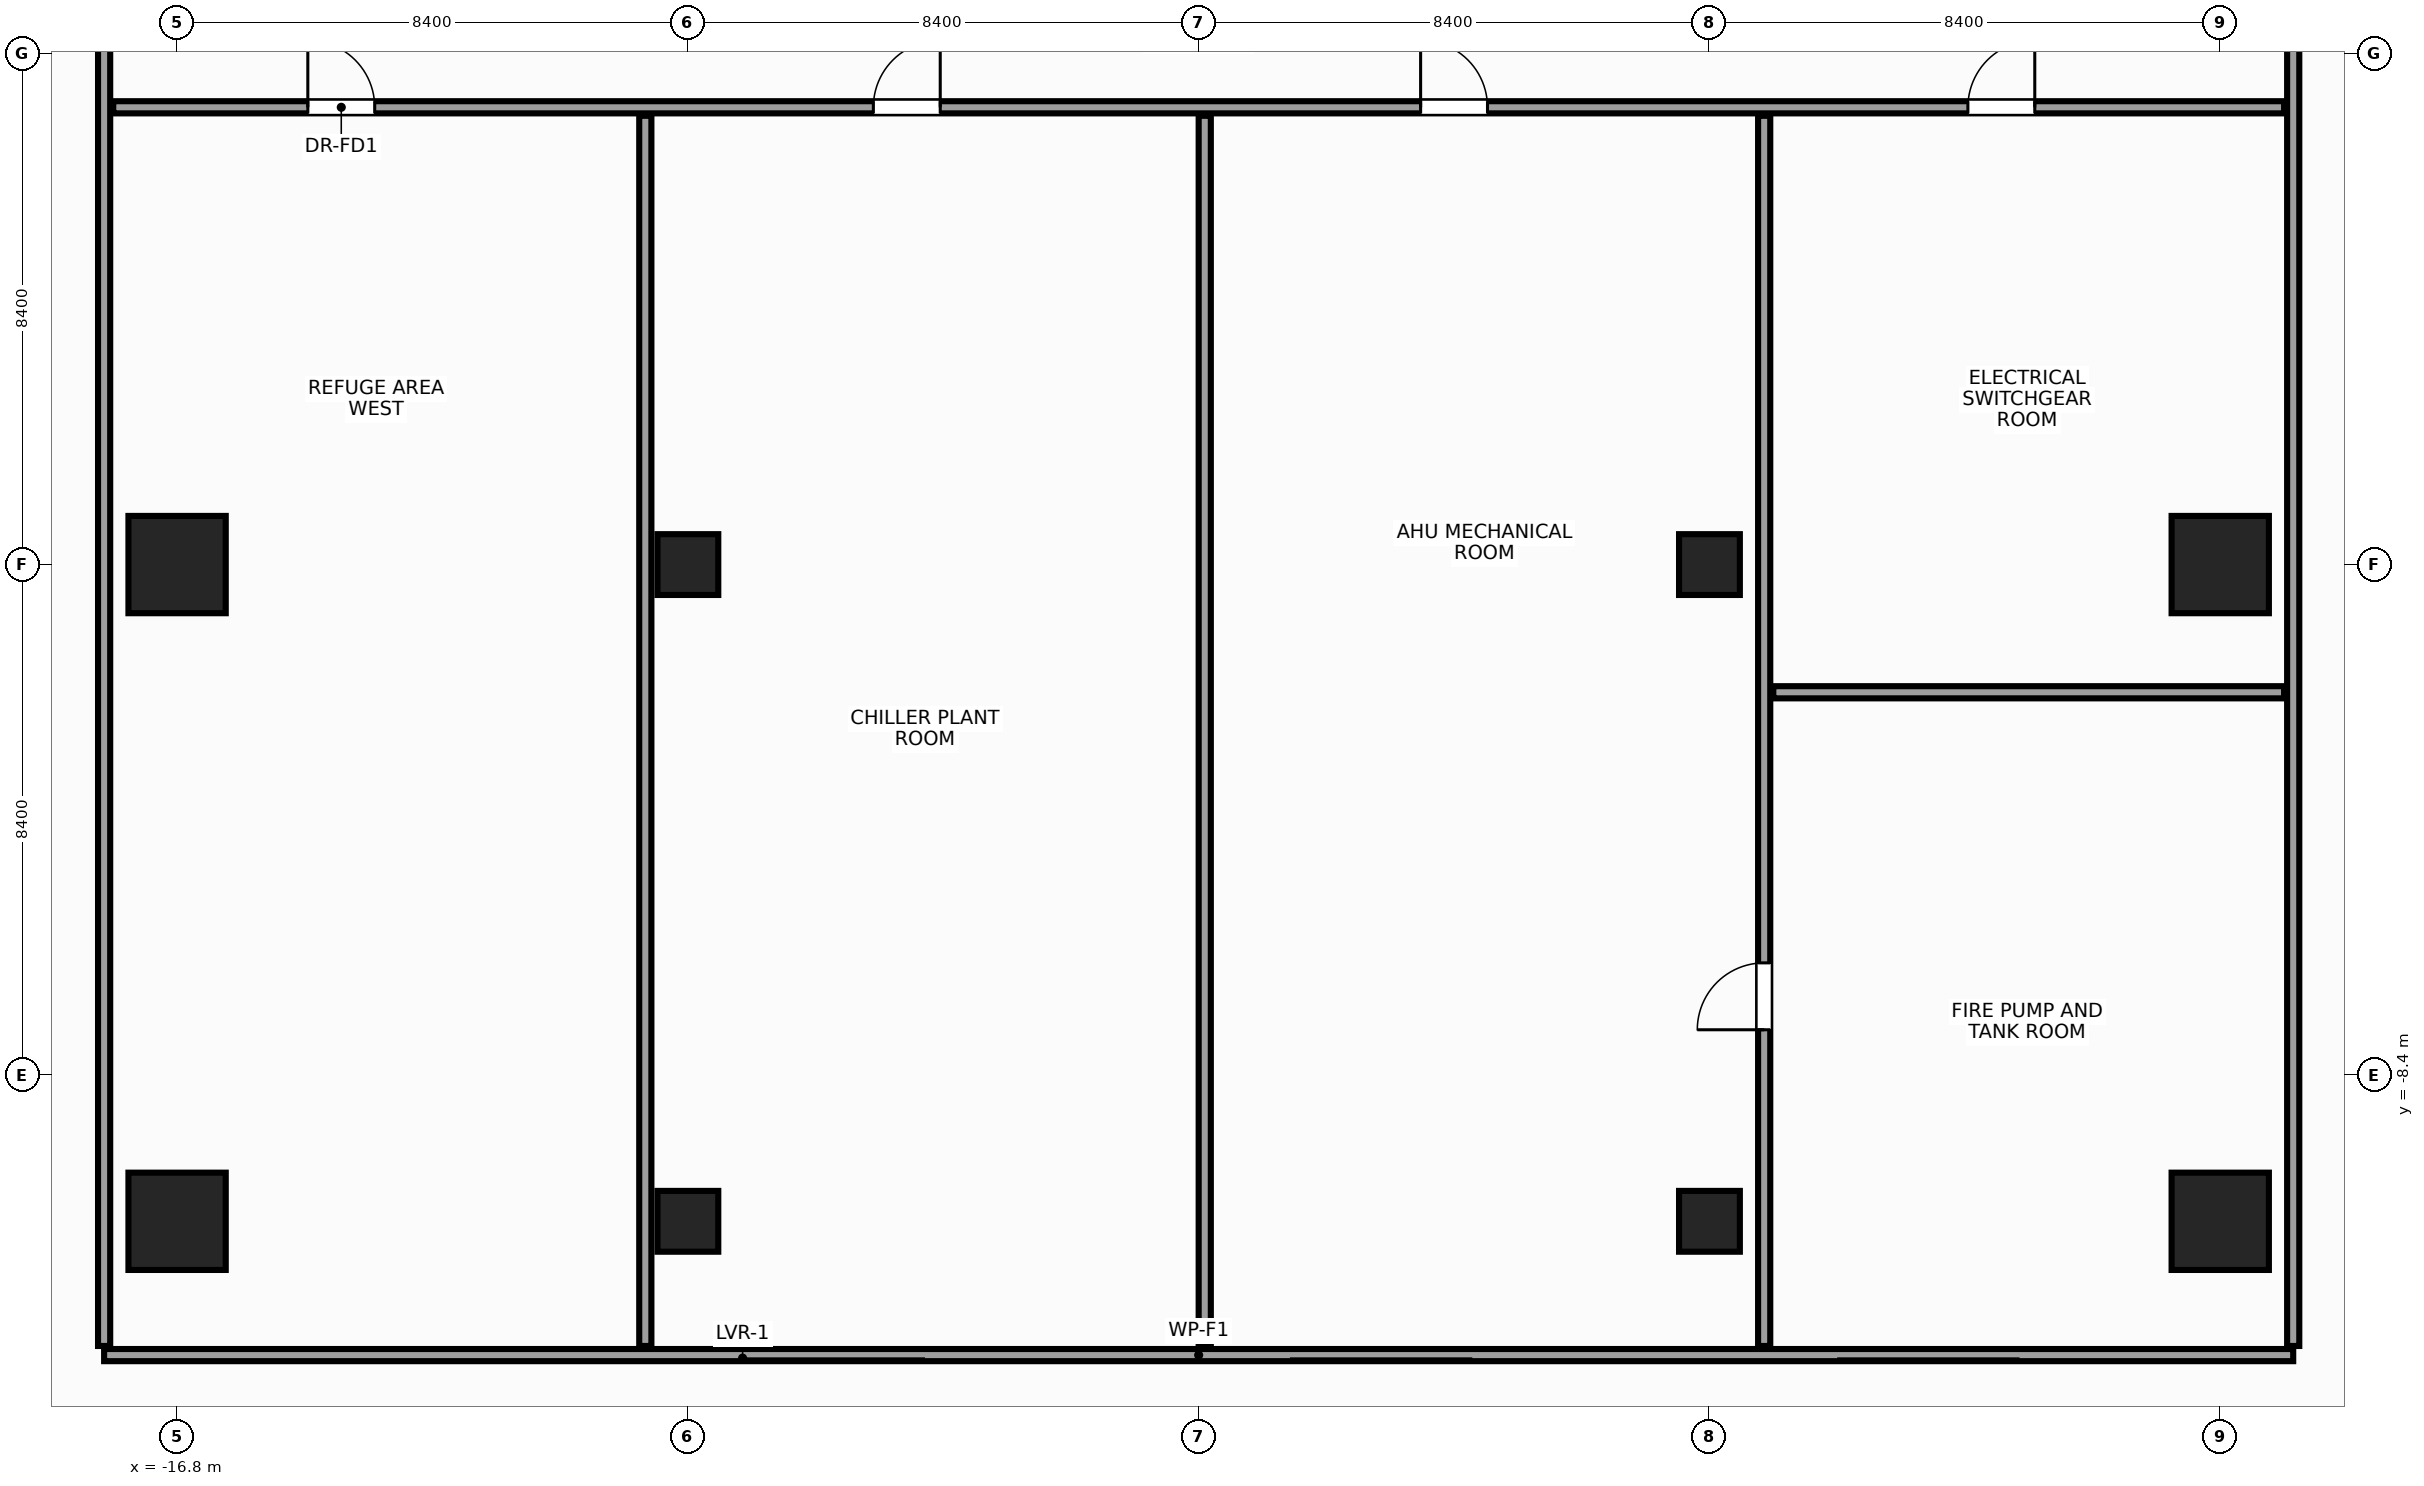
"""IFC4 building model, lengths in metres.
Left out: names, types, materials, properties, quantities, classifications, styles, units other than length and angle.
Written with IfcOpenShell. Run it as: python <this file> out.ifc"""

import sys

from ifc_helpers import new_model, si_unit, direction, frame, frame_2d, origin, origin_2d, place, context, subcontext, project, spatial, rectangle, hollow_rectangle, extrude, source, transform, mapped, element, fill, save


model = new_model("IFC4")
c1 = context("Model", 3, precision=1e-05, world=origin(), true_north=direction((0.0, 1.0)))
c2 = subcontext(c1, "Body", "Model", "MODEL_VIEW")
j1 = project(units=[si_unit("LENGTHUNIT", "METRE"), si_unit("PLANEANGLEUNIT", "RADIAN")], contexts=[c1])
p1 = place(None, origin())
s1 = spatial("IfcSite", under=j1, at=p1, CompositionType="ELEMENT")
p2 = place(p1, origin())
s2 = spatial("IfcBuilding", under=s1, at=p2, CompositionType="ELEMENT")
p3 = place(p2, frame((0.0, 0.0, 189.2)))
s3 = spatial("IfcBuildingStorey", under=s2, at=p3, CompositionType="ELEMENT", Elevation=189.2)
m1 = source(origin(), c2, "Body", "SweptSolid", [
    extrude(rectangle(XDim=1.6, YDim=1.6, at=origin_2d()), origin(), (0.0, 0.0, 1.0), 7.2),
])
for number, where, z_axis, x_axis in (
    (1, (-16.8, -10.8, 0.0), (0.0, 0.0, 1.0), (1.0, 0.0, 0.0)),
    (2, (-16.8, 0.0, 0.0), (0.0, 0.0, 1.0), (1.0, 0.0, 0.0)),
    (3, (16.8, -10.8, 0.0), (0.0, 0.0, 1.0), (1.0, 0.0, 0.0)),
    (4, (16.8, 0.0, 0.0), (0.0, 0.0, 1.0), (1.0, 0.0, 0.0)),
):
    element("IfcColumn", number, at=place(p3, frame(where, z_axis=z_axis, x_axis=x_axis)), inside=s3, PredefinedType="COLUMN", context=c2, shape_type="MappedRepresentation", body=[
        mapped(m1, transform((0.0, 0.0, 0.0), x_axis=(1.0, 0.0, 0.0), y_axis=(0.0, 1.0, 0.0), z_axis=(0.0, 0.0, 1.0), scale=1.0)),
    ])
m2 = source(origin(), c2, "Body", "SweptSolid", [
    extrude(hollow_rectangle(XDim=1.0, YDim=1.0, WallThickness=0.045, at=origin_2d()), origin(), (0.0, 0.0, 1.0), 7.2),
])
for number, where, z_axis, x_axis in (
    (5, (-8.4, 0.0, 0.0), (0.0, 0.0, 1.0), (1.0, 0.0, 0.0)),
    (6, (-8.4, -10.8, 0.0), (0.0, 0.0, 1.0), (1.0, 0.0, 0.0)),
    (7, (8.4, 0.0, 0.0), (0.0, 0.0, 1.0), (1.0, 0.0, 0.0)),
    (8, (8.4, -10.8, 0.0), (0.0, 0.0, 1.0), (1.0, 0.0, 0.0)),
):
    element("IfcColumn", number, at=place(p3, frame(where, z_axis=z_axis, x_axis=x_axis)), inside=s3, PredefinedType="COLUMN", context=c2, shape_type="MappedRepresentation", body=[
        mapped(m2, transform((0.0, 0.0, 0.0), x_axis=(1.0, 0.0, 0.0), y_axis=(0.0, 1.0, 0.0), z_axis=(0.0, 0.0, 1.0), scale=1.0)),
    ])
m3 = source(origin(), c2, "Body", "SweptSolid", [
    extrude(rectangle(XDim=36.0, YDim=0.2, at=frame_2d((18.0, 0.0))), origin(), (0.0, 0.0, 1.0), 6.9),
])
p4 = place(p3, frame((-18.0, -13.0, 0.0), z_axis=(0.0, 0.0, 1.0), x_axis=(1.0, 0.0, 0.0)))
e9 = element("IfcWall", 9, at=p4, inside=s3, PredefinedType="PARTITIONING", context=c2, shape_type="MappedRepresentation", body=[
    mapped(m3, transform((0.0, 0.0, 0.0), x_axis=(1.0, 0.0, 0.0), y_axis=(0.0, 1.0, 0.0), z_axis=(0.0, 0.0, 1.0), scale=1.0)),
])
m4 = source(origin(), c2, "Body", "SweptSolid", [
    extrude(rectangle(XDim=22.85, YDim=0.2, at=frame_2d((11.425, 0.0))), origin(), (0.0, 0.0, 1.0), 6.435),
])
for number, where, z_axis, x_axis in (
    (10, (-18.0, -12.85, 0.0), (0.0, 0.0, 1.0), (0.0, 1.0, 0.0)),
    (11, (18.0, -12.85, 0.0), (0.0, 0.0, 1.0), (0.0, 1.0, 0.0)),
):
    element("IfcWall", number, at=place(p3, frame(where, z_axis=z_axis, x_axis=x_axis)), inside=s3, PredefinedType="PARTITIONING", context=c2, shape_type="MappedRepresentation", body=[
        mapped(m4, transform((0.0, 0.0, 0.0), x_axis=(1.0, 0.0, 0.0), y_axis=(0.0, 1.0, 0.0), z_axis=(0.0, 0.0, 1.0), scale=1.0)),
    ])
m5 = source(origin(), c2, "Body", "SweptSolid", [
    extrude(rectangle(XDim=35.7, YDim=0.2, at=frame_2d((17.85, 0.0))), origin(), (0.0, 0.0, 1.0), 6.285),
])
p5 = place(p3, frame((-17.85, 7.52, 0.0), z_axis=(0.0, 0.0, 1.0), x_axis=(1.0, 0.0, 0.0)))
e12 = element("IfcWall", 12, at=p5, inside=s3, PredefinedType="PARTITIONING", context=c2, shape_type="MappedRepresentation", body=[
    mapped(m5, transform((0.0, 0.0, 0.0), x_axis=(1.0, 0.0, 0.0), y_axis=(0.0, 1.0, 0.0), z_axis=(0.0, 0.0, 1.0), scale=1.0)),
])
p6 = place(p5, frame((3.2, 0.0, 0.0)))
e13 = element("IfcOpeningElement", 13, at=p6, cuts=e12, PredefinedType="OPENING", context=c2, shape_type="SweptSolid", body=[
    extrude(rectangle(XDim=1.1, YDim=2.15, at=frame_2d((0.55, 1.075))), frame((0.0, 0.112, 0.0), z_axis=(0.0, -1.0, 0.0), x_axis=(1.0, 0.0, 0.0)), (0.0, 0.0, 1.0), 0.224),
])
p7 = place(p5, frame((12.5, 0.0, 0.0)))
e14 = element("IfcOpeningElement", 14, at=p7, cuts=e12, PredefinedType="OPENING", context=c2, shape_type="SweptSolid", body=[
    extrude(rectangle(XDim=1.1, YDim=2.15, at=frame_2d((0.55, 1.075))), frame((0.0, 0.112, 0.0), z_axis=(0.0, -1.0, 0.0), x_axis=(1.0, 0.0, 0.0)), (0.0, 0.0, 1.0), 0.224),
])
p8 = place(p5, frame((21.5, 0.0, 0.0)))
e15 = element("IfcOpeningElement", 15, at=p8, cuts=e12, PredefinedType="OPENING", context=c2, shape_type="SweptSolid", body=[
    extrude(rectangle(XDim=1.1, YDim=2.15, at=frame_2d((0.55, 1.075))), frame((0.0, 0.112, 0.0), z_axis=(0.0, -1.0, 0.0), x_axis=(1.0, 0.0, 0.0)), (0.0, 0.0, 1.0), 0.224),
])
p9 = place(p5, frame((30.5, 0.0, 0.0)))
e16 = element("IfcOpeningElement", 16, at=p9, cuts=e12, PredefinedType="OPENING", context=c2, shape_type="SweptSolid", body=[
    extrude(rectangle(XDim=1.1, YDim=2.15, at=frame_2d((0.55, 1.075))), frame((0.0, 0.112, 0.0), z_axis=(0.0, -1.0, 0.0), x_axis=(1.0, 0.0, 0.0)), (0.0, 0.0, 1.0), 0.224),
])
m6 = source(origin(), c2, "Body", "SweptSolid", [
    extrude(rectangle(XDim=20.23, YDim=0.2, at=frame_2d((10.115, 0.0))), origin(), (0.0, 0.0, 1.0), 6.435),
])
p10 = place(p3, frame((-9.1, -12.85, 0.0), z_axis=(0.0, 0.0, 1.0), x_axis=(0.0, 1.0, 0.0)))
e17 = element("IfcWall", 17, at=p10, inside=s3, PredefinedType="PARTITIONING", context=c2, shape_type="MappedRepresentation", body=[
    mapped(m6, transform((0.0, 0.0, 0.0), x_axis=(1.0, 0.0, 0.0), y_axis=(0.0, 1.0, 0.0), z_axis=(0.0, 0.0, 1.0), scale=1.0)),
])
m7 = source(origin(), c2, "Body", "SweptSolid", [
    extrude(rectangle(XDim=20.23, YDim=0.2, at=frame_2d((10.115, 0.0))), origin(), (0.0, 0.0, 1.0), 6.225),
])
p11 = place(p3, frame((0.1, -12.85, 0.0), z_axis=(0.0, 0.0, 1.0), x_axis=(0.0, 1.0, 0.0)))
e18 = element("IfcWall", 18, at=p11, inside=s3, PredefinedType="PARTITIONING", context=c2, shape_type="MappedRepresentation", body=[
    mapped(m7, transform((0.0, 0.0, 0.0), x_axis=(1.0, 0.0, 0.0), y_axis=(0.0, 1.0, 0.0), z_axis=(0.0, 0.0, 1.0), scale=1.0)),
])
p12 = place(p3, frame((9.3, -12.85, 0.0), z_axis=(0.0, 0.0, 1.0), x_axis=(0.0, 1.0, 0.0)))
e19 = element("IfcWall", 19, at=p12, inside=s3, PredefinedType="PARTITIONING", context=c2, shape_type="MappedRepresentation", body=[
    mapped(m6, transform((0.0, 0.0, 0.0), x_axis=(1.0, 0.0, 0.0), y_axis=(0.0, 1.0, 0.0), z_axis=(0.0, 0.0, 1.0), scale=1.0)),
])
p13 = place(p12, frame((5.2, 0.0, 0.0)))
e20 = element("IfcOpeningElement", 20, at=p13, cuts=e19, PredefinedType="OPENING", context=c2, shape_type="SweptSolid", body=[
    extrude(rectangle(XDim=1.1, YDim=2.15, at=frame_2d((0.55, 1.075))), frame((0.0, 0.112, 0.0), z_axis=(0.0, -1.0, 0.0), x_axis=(1.0, 0.0, 0.0)), (0.0, 0.0, 1.0), 0.224),
])
m8 = source(origin(), c2, "Body", "SweptSolid", [
    extrude(rectangle(XDim=8.4, YDim=0.2, at=frame_2d((4.2, 0.0))), origin(), (0.0, 0.0, 1.0), 6.285),
])
p14 = place(p3, frame((9.45, -2.1, 0.0), z_axis=(0.0, 0.0, 1.0), x_axis=(1.0, 0.0, 0.0)))
e21 = element("IfcWall", 21, at=p14, inside=s3, PredefinedType="PARTITIONING", context=c2, shape_type="MappedRepresentation", body=[
    mapped(m8, transform((0.0, 0.0, 0.0), x_axis=(1.0, 0.0, 0.0), y_axis=(0.0, 1.0, 0.0), z_axis=(0.0, 0.0, 1.0), scale=1.0)),
])
m9 = source(origin(), c2, "Body", "SweptSolid", [
    extrude(rectangle(XDim=1.1, YDim=2.15, at=frame_2d((0.55, 1.075))), frame((0.0, 0.025, 0.0), z_axis=(0.0, -1.0, 0.0), x_axis=(1.0, 0.0, 0.0)), (0.0, 0.0, 1.0), 0.05),
])
p15 = place(p6, origin())
e22 = element("IfcDoor", 22, at=p15, inside=s3, OperationType="SINGLE_SWING_LEFT", PredefinedType="DOOR", context=c2, shape_type="MappedRepresentation", body=[
    mapped(m9, transform((0.0, 0.0, 0.0), x_axis=(1.0, 0.0, 0.0), y_axis=(0.0, 1.0, 0.0), z_axis=(0.0, 0.0, 1.0), scale=1.0)),
])
fill(e13, e22)
p16 = place(p7, origin())
e23 = element("IfcDoor", 23, at=p16, inside=s3, OperationType="SINGLE_SWING_RIGHT", PredefinedType="DOOR", context=c2, shape_type="MappedRepresentation", body=[
    mapped(m9, transform((0.0, 0.0, 0.0), x_axis=(1.0, 0.0, 0.0), y_axis=(0.0, 1.0, 0.0), z_axis=(0.0, 0.0, 1.0), scale=1.0)),
])
fill(e14, e23)
p17 = place(p8, origin())
e24 = element("IfcDoor", 24, at=p17, inside=s3, OperationType="SINGLE_SWING_LEFT", PredefinedType="DOOR", context=c2, shape_type="MappedRepresentation", body=[
    mapped(m9, transform((0.0, 0.0, 0.0), x_axis=(1.0, 0.0, 0.0), y_axis=(0.0, 1.0, 0.0), z_axis=(0.0, 0.0, 1.0), scale=1.0)),
])
fill(e15, e24)
p18 = place(p9, origin())
e25 = element("IfcDoor", 25, at=p18, inside=s3, OperationType="SINGLE_SWING_RIGHT", PredefinedType="DOOR", context=c2, shape_type="MappedRepresentation", body=[
    mapped(m9, transform((0.0, 0.0, 0.0), x_axis=(1.0, 0.0, 0.0), y_axis=(0.0, 1.0, 0.0), z_axis=(0.0, 0.0, 1.0), scale=1.0)),
])
fill(e16, e25)
p19 = place(p13, origin())
e26 = element("IfcDoor", 26, at=p19, inside=s3, OperationType="SINGLE_SWING_LEFT", PredefinedType="DOOR", context=c2, shape_type="MappedRepresentation", body=[
    mapped(m9, transform((0.0, 0.0, 0.0), x_axis=(1.0, 0.0, 0.0), y_axis=(0.0, 1.0, 0.0), z_axis=(0.0, 0.0, 1.0), scale=1.0)),
])
fill(e20, e26)
save(model, sys.argv[1])
